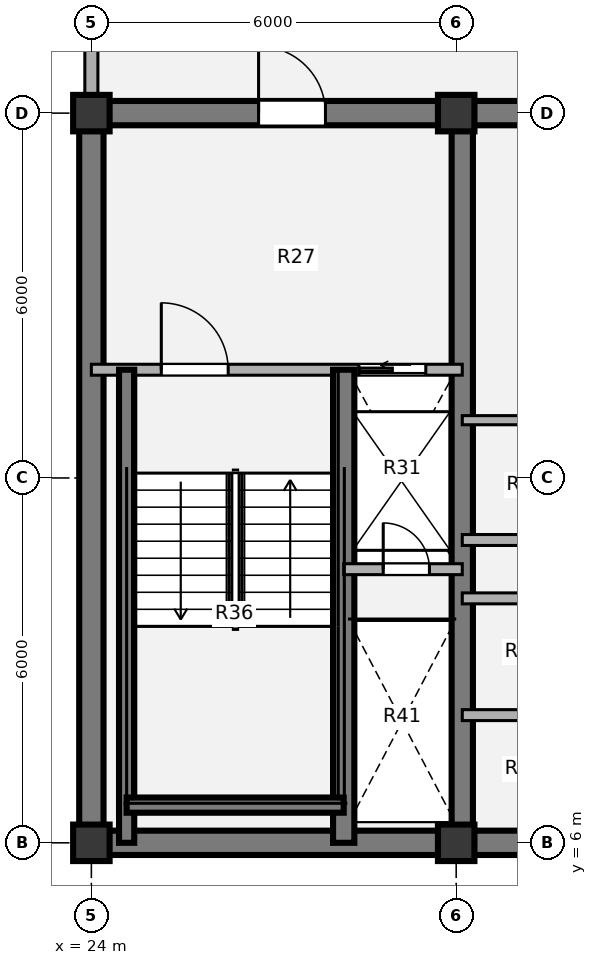
"""IFC4 building model, lengths in metres.
Left out: names, types, materials, properties, quantities, classifications, styles, units other than length and angle.
Written with IfcOpenShell. Run it as: python <this file> out.ifc"""

import sys

from ifc_helpers import new_model, si_unit, direction, frame, frame_2d, origin, origin_2d, place, context, subcontext, project, spatial, rectangle, extrude, source, transform, mapped, element, fill, save


model = new_model("IFC4")
c1 = context("Model", 3, precision=1e-05, world=origin(), true_north=direction((0.0, 1.0)))
c2 = subcontext(c1, "Body", "Model", "MODEL_VIEW")
j1 = project(units=[si_unit("LENGTHUNIT", "METRE"), si_unit("PLANEANGLEUNIT", "RADIAN")], contexts=[c1])
p1 = place(None, origin())
s1 = spatial("IfcSite", under=j1, at=p1, CompositionType="ELEMENT")
p2 = place(p1, origin())
s2 = spatial("IfcBuilding", under=s1, at=p2, CompositionType="ELEMENT")
p3 = place(p2, frame((0.0, 0.0, 268.38)))
s3 = spatial("IfcBuildingStorey", under=s2, at=p3, CompositionType="ELEMENT", Elevation=268.38)
m1 = source(origin(), c2, "Body", "SweptSolid", [
    extrude(rectangle(XDim=0.6, YDim=0.6, at=origin_2d()), origin(), (0.0, 0.0, 1.0), 3.78),
])
for number, where, z_axis, x_axis in (
    (1, (24.0, 6.0, 0.0), (0.0, 0.0, 1.0), (1.0, 0.0, 0.0)),
    (2, (30.0, 6.0, 0.0), (0.0, 0.0, 1.0), (1.0, 0.0, 0.0)),
    (3, (24.0, 18.0, 0.0), (0.0, 0.0, 1.0), (1.0, 0.0, 0.0)),
    (4, (30.0, 18.0, 0.0), (0.0, 0.0, 1.0), (1.0, 0.0, 0.0)),
):
    element("IfcColumn", number, at=place(p3, frame(where, z_axis=z_axis, x_axis=x_axis)), inside=s3, PredefinedType="COLUMN", context=c2, shape_type="MappedRepresentation", body=[
        mapped(m1, transform((0.0, 0.0, 0.0), x_axis=(1.0, 0.0, 0.0), y_axis=(0.0, 1.0, 0.0), z_axis=(0.0, 0.0, 1.0), scale=1.0)),
    ])
p4 = place(p3, frame((48.2, 6.0, 0.0), z_axis=(0.0, 0.0, 1.0), x_axis=(-1.0, 0.0, 0.0)))
e5 = element("IfcWall", 5, at=p4, inside=s3, PredefinedType="SHEAR", context=c2, shape_type="SweptSolid", body=[
    extrude(rectangle(XDim=24.4, YDim=0.4, at=frame_2d((12.2, 0.0))), origin(), (0.0, 0.0, 1.0), 3.78),
])
p5 = place(p3, frame((24.0, 6.0, 0.0), z_axis=(0.0, 0.0, 1.0), x_axis=(0.0, 1.0, 0.0)))
e6 = element("IfcWall", 6, at=p5, inside=s3, PredefinedType="SHEAR", context=c2, shape_type="SweptSolid", body=[
    extrude(rectangle(XDim=12.0, YDim=0.4, at=frame_2d((6.0, 0.0))), origin(), (0.0, 0.0, 1.0), 3.78),
])
p6 = place(p3, frame((23.8, 18.0, 0.0), z_axis=(0.0, 0.0, 1.0), x_axis=(1.0, 0.0, 0.0)))
e7 = element("IfcWall", 7, at=p6, inside=s3, PredefinedType="SHEAR", context=c2, shape_type="SweptSolid", body=[
    extrude(rectangle(XDim=9.4, YDim=0.4, at=frame_2d((4.7, 0.0))), origin(), (0.0, 0.0, 1.0), 3.78),
])
p7 = place(p6, frame((2.95, 0.0, 0.0)))
e8 = element("IfcOpeningElement", 8, at=p7, cuts=e7, PredefinedType="OPENING", context=c2, shape_type="SweptSolid", body=[
    extrude(rectangle(XDim=1.1, YDim=2.1, at=origin_2d()), frame((0.55, 0.21, 1.05), z_axis=(0.0, -1.0, 0.0), x_axis=(1.0, 0.0, 0.0)), (0.0, 0.0, 1.0), 0.42),
])
p8 = place(p3, frame((30.1, 6.0, 0.0), z_axis=(0.0, 0.0, 1.0), x_axis=(0.0, 1.0, 0.0)))
e9 = element("IfcWall", 9, at=p8, inside=s3, PredefinedType="SHEAR", context=c2, shape_type="SweptSolid", body=[
    extrude(rectangle(XDim=12.0, YDim=0.35, at=frame_2d((6.0, 0.0))), origin(), (0.0, 0.0, 1.0), 3.78),
])
p9 = place(p3, frame((24.0, 18.28, 0.0), z_axis=(0.0, 0.0, 1.0), x_axis=(0.0, 1.0, 0.0)))
e10 = element("IfcWall", 10, at=p9, inside=s3, PredefinedType="SOLIDWALL", context=c2, shape_type="SweptSolid", body=[
    extrude(rectangle(XDim=2.77, YDim=0.215, at=frame_2d((1.385, 0.0))), origin(), (0.0, 0.0, 1.0), 2.718),
])
p10 = place(p3, frame((30.1, 12.95, 0.0), z_axis=(0.0, 0.0, 1.0), x_axis=(1.0, 0.0, 0.0)))
e11 = element("IfcWall", 11, at=p10, inside=s3, PredefinedType="PARTITIONING", context=c2, shape_type="SweptSolid", body=[
    extrude(rectangle(XDim=2.5, YDim=0.15, at=frame_2d((1.25, 0.0))), origin(), (0.0, 0.0, 1.0), 3.5),
])
for number, where, z_axis, x_axis in (
    (12, (30.1, 10.98, 0.0), (0.0, 0.0, 1.0), (1.0, 0.0, 0.0)),
    (13, (30.1, 8.1, 0.0), (0.0, 0.0, 1.0), (1.0, 0.0, 0.0)),
    (14, (30.1, 10.02, 0.0), (0.0, 0.0, 1.0), (1.0, 0.0, 0.0)),
):
    element("IfcWall", number, at=place(p3, frame(where, z_axis=z_axis, x_axis=x_axis)), inside=s3, PredefinedType="PARTITIONING", context=c2, shape_type="SweptSolid", body=[
        extrude(rectangle(XDim=2.5, YDim=0.18, at=frame_2d((1.25, 0.0))), origin(), (0.0, 0.0, 1.0), 3.5),
    ])
p11 = place(p3, frame((24.0, 13.78, 0.0), z_axis=(0.0, 0.0, 1.0), x_axis=(1.0, 0.0, 0.0)))
e15 = element("IfcWall", 15, at=p11, inside=s3, PredefinedType="PARTITIONING", context=c2, shape_type="SweptSolid", body=[
    extrude(rectangle(XDim=6.1, YDim=0.18, at=frame_2d((3.05, 0.0))), origin(), (0.0, 0.0, 1.0), 3.5),
])
p12 = place(p11, frame((1.15, 0.0, 0.0)))
e16 = element("IfcOpeningElement", 16, at=p12, cuts=e15, PredefinedType="OPENING", context=c2, shape_type="SweptSolid", body=[
    extrude(rectangle(XDim=1.1, YDim=2.1, at=origin_2d()), frame((0.55, 0.1, 1.05), z_axis=(0.0, -1.0, 0.0), x_axis=(1.0, 0.0, 0.0)), (0.0, 0.0, 1.0), 0.2),
])
p13 = place(p11, frame((4.4, 0.0, 0.0)))
e17 = element("IfcOpeningElement", 17, at=p13, cuts=e15, PredefinedType="OPENING", context=c2, shape_type="SweptSolid", body=[
    extrude(rectangle(XDim=1.1, YDim=2.1, at=origin_2d()), frame((0.55, 0.1, 1.05), z_axis=(0.0, -1.0, 0.0), x_axis=(1.0, 0.0, 0.0)), (0.0, 0.0, 1.0), 0.2),
])
p14 = place(p3, frame((28.15, 6.0, 0.0), z_axis=(0.0, 0.0, 1.0), x_axis=(0.0, 1.0, 0.0)))
e18 = element("IfcWall", 18, at=p14, inside=s3, PredefinedType="SHEAR", context=c2, shape_type="SweptSolid", body=[
    extrude(rectangle(XDim=7.78, YDim=0.35, at=frame_2d((3.89, 0.0))), origin(), (0.0, 0.0, 1.0), 3.85),
])
p15 = place(p3, frame((24.58, 6.0, 0.0), z_axis=(0.0, 0.0, 1.0), x_axis=(0.0, 1.0, 0.0)))
e19 = element("IfcWall", 19, at=p15, inside=s3, PredefinedType="SHEAR", context=c2, shape_type="SweptSolid", body=[
    extrude(rectangle(XDim=7.78, YDim=0.25, at=frame_2d((3.89, 0.0))), origin(), (0.0, 0.0, 1.0), 3.85),
])
p16 = place(p3, frame((24.58, 6.62, 0.0), z_axis=(0.0, 0.0, 1.0), x_axis=(1.0, 0.0, 0.0)))
e20 = element("IfcWall", 20, at=p16, inside=s3, PredefinedType="SHEAR", context=c2, shape_type="SweptSolid", body=[
    extrude(rectangle(XDim=3.57, YDim=0.25, at=frame_2d((1.785, 0.0))), origin(), (0.0, 0.0, 1.0), 3.85),
])
p17 = place(p3, frame((28.15, 10.5, 0.0), z_axis=(0.0, 0.0, 1.0), x_axis=(1.0, 0.0, 0.0)))
e21 = element("IfcWall", 21, at=p17, inside=s3, PredefinedType="PARTITIONING", context=c2, shape_type="SweptSolid", body=[
    extrude(rectangle(XDim=1.95, YDim=0.18, at=frame_2d((0.975, 0.0))), origin(), (0.0, 0.0, 1.0), 3.5),
])
p18 = place(p17, frame((0.65, 0.0, 0.0)))
e22 = element("IfcOpeningElement", 22, at=p18, cuts=e21, PredefinedType="OPENING", context=c2, shape_type="SweptSolid", body=[
    extrude(rectangle(XDim=0.76, YDim=2.05, at=origin_2d()), frame((0.38, 0.1, 1.025), z_axis=(0.0, -1.0, 0.0), x_axis=(1.0, 0.0, 0.0)), (0.0, 0.0, 1.0), 0.2),
])
m2 = source(origin(), c2, "Body", "SweptSolid", [
    extrude(rectangle(XDim=1.1, YDim=2.1, at=origin_2d()), frame((0.55, 0.025, 1.05), z_axis=(0.0, -1.0, 0.0), x_axis=(1.0, 0.0, 0.0)), (0.0, 0.0, 1.0), 0.05),
])
p19 = place(p12, origin())
e23 = element("IfcDoor", 23, at=p19, inside=s3, OperationType="SINGLE_SWING_LEFT", PredefinedType="DOOR", context=c2, shape_type="MappedRepresentation", body=[
    mapped(m2, transform((0.0, 0.0, 0.0), x_axis=(1.0, 0.0, 0.0), y_axis=(0.0, 1.0, 0.0), z_axis=(0.0, 0.0, 1.0), scale=1.0)),
])
fill(e16, e23)
m3 = source(origin(), c2, "Body", "SweptSolid", [
    extrude(rectangle(XDim=1.1, YDim=2.1, at=origin_2d()), frame((0.55, 0.025, 1.05), z_axis=(0.0, -1.0, 0.0), x_axis=(1.0, 0.0, 0.0)), (0.0, 0.0, 1.0), 0.05),
])
p20 = place(p13, origin())
e24 = element("IfcDoor", 24, at=p20, inside=s3, OperationType="SLIDING_TO_LEFT", PredefinedType="DOOR", context=c2, shape_type="MappedRepresentation", body=[
    mapped(m3, transform((0.0, 0.0, 0.0), x_axis=(1.0, 0.0, 0.0), y_axis=(0.0, 1.0, 0.0), z_axis=(0.0, 0.0, 1.0), scale=1.0)),
])
fill(e17, e24)
m4 = source(origin(), c2, "Body", "SweptSolid", [
    extrude(rectangle(XDim=0.76, YDim=2.05, at=origin_2d()), frame((0.38, 0.025, 1.025), z_axis=(0.0, -1.0, 0.0), x_axis=(1.0, 0.0, 0.0)), (0.0, 0.0, 1.0), 0.05),
])
p21 = place(p18, origin())
e25 = element("IfcDoor", 25, at=p21, inside=s3, OperationType="SINGLE_SWING_LEFT", PredefinedType="DOOR", context=c2, shape_type="MappedRepresentation", body=[
    mapped(m4, transform((0.0, 0.0, 0.0), x_axis=(1.0, 0.0, 0.0), y_axis=(0.0, 1.0, 0.0), z_axis=(0.0, 0.0, 1.0), scale=1.0)),
])
fill(e22, e25)
m5 = source(origin(), c2, "Body", "SweptSolid", [
    extrude(rectangle(XDim=1.1, YDim=2.1, at=origin_2d()), frame((0.55, 0.025, 1.05), z_axis=(0.0, -1.0, 0.0), x_axis=(1.0, 0.0, 0.0)), (0.0, 0.0, 1.0), 0.05),
])
p22 = place(p7, origin())
e26 = element("IfcDoor", 26, at=p22, inside=s3, OperationType="SINGLE_SWING_LEFT", PredefinedType="DOOR", context=c2, shape_type="MappedRepresentation", body=[
    mapped(m5, transform((0.0, 0.0, 0.0), x_axis=(1.0, 0.0, 0.0), y_axis=(0.0, 1.0, 0.0), z_axis=(0.0, 0.0, 1.0), scale=1.0)),
])
fill(e8, e26)
save(model, sys.argv[1])
